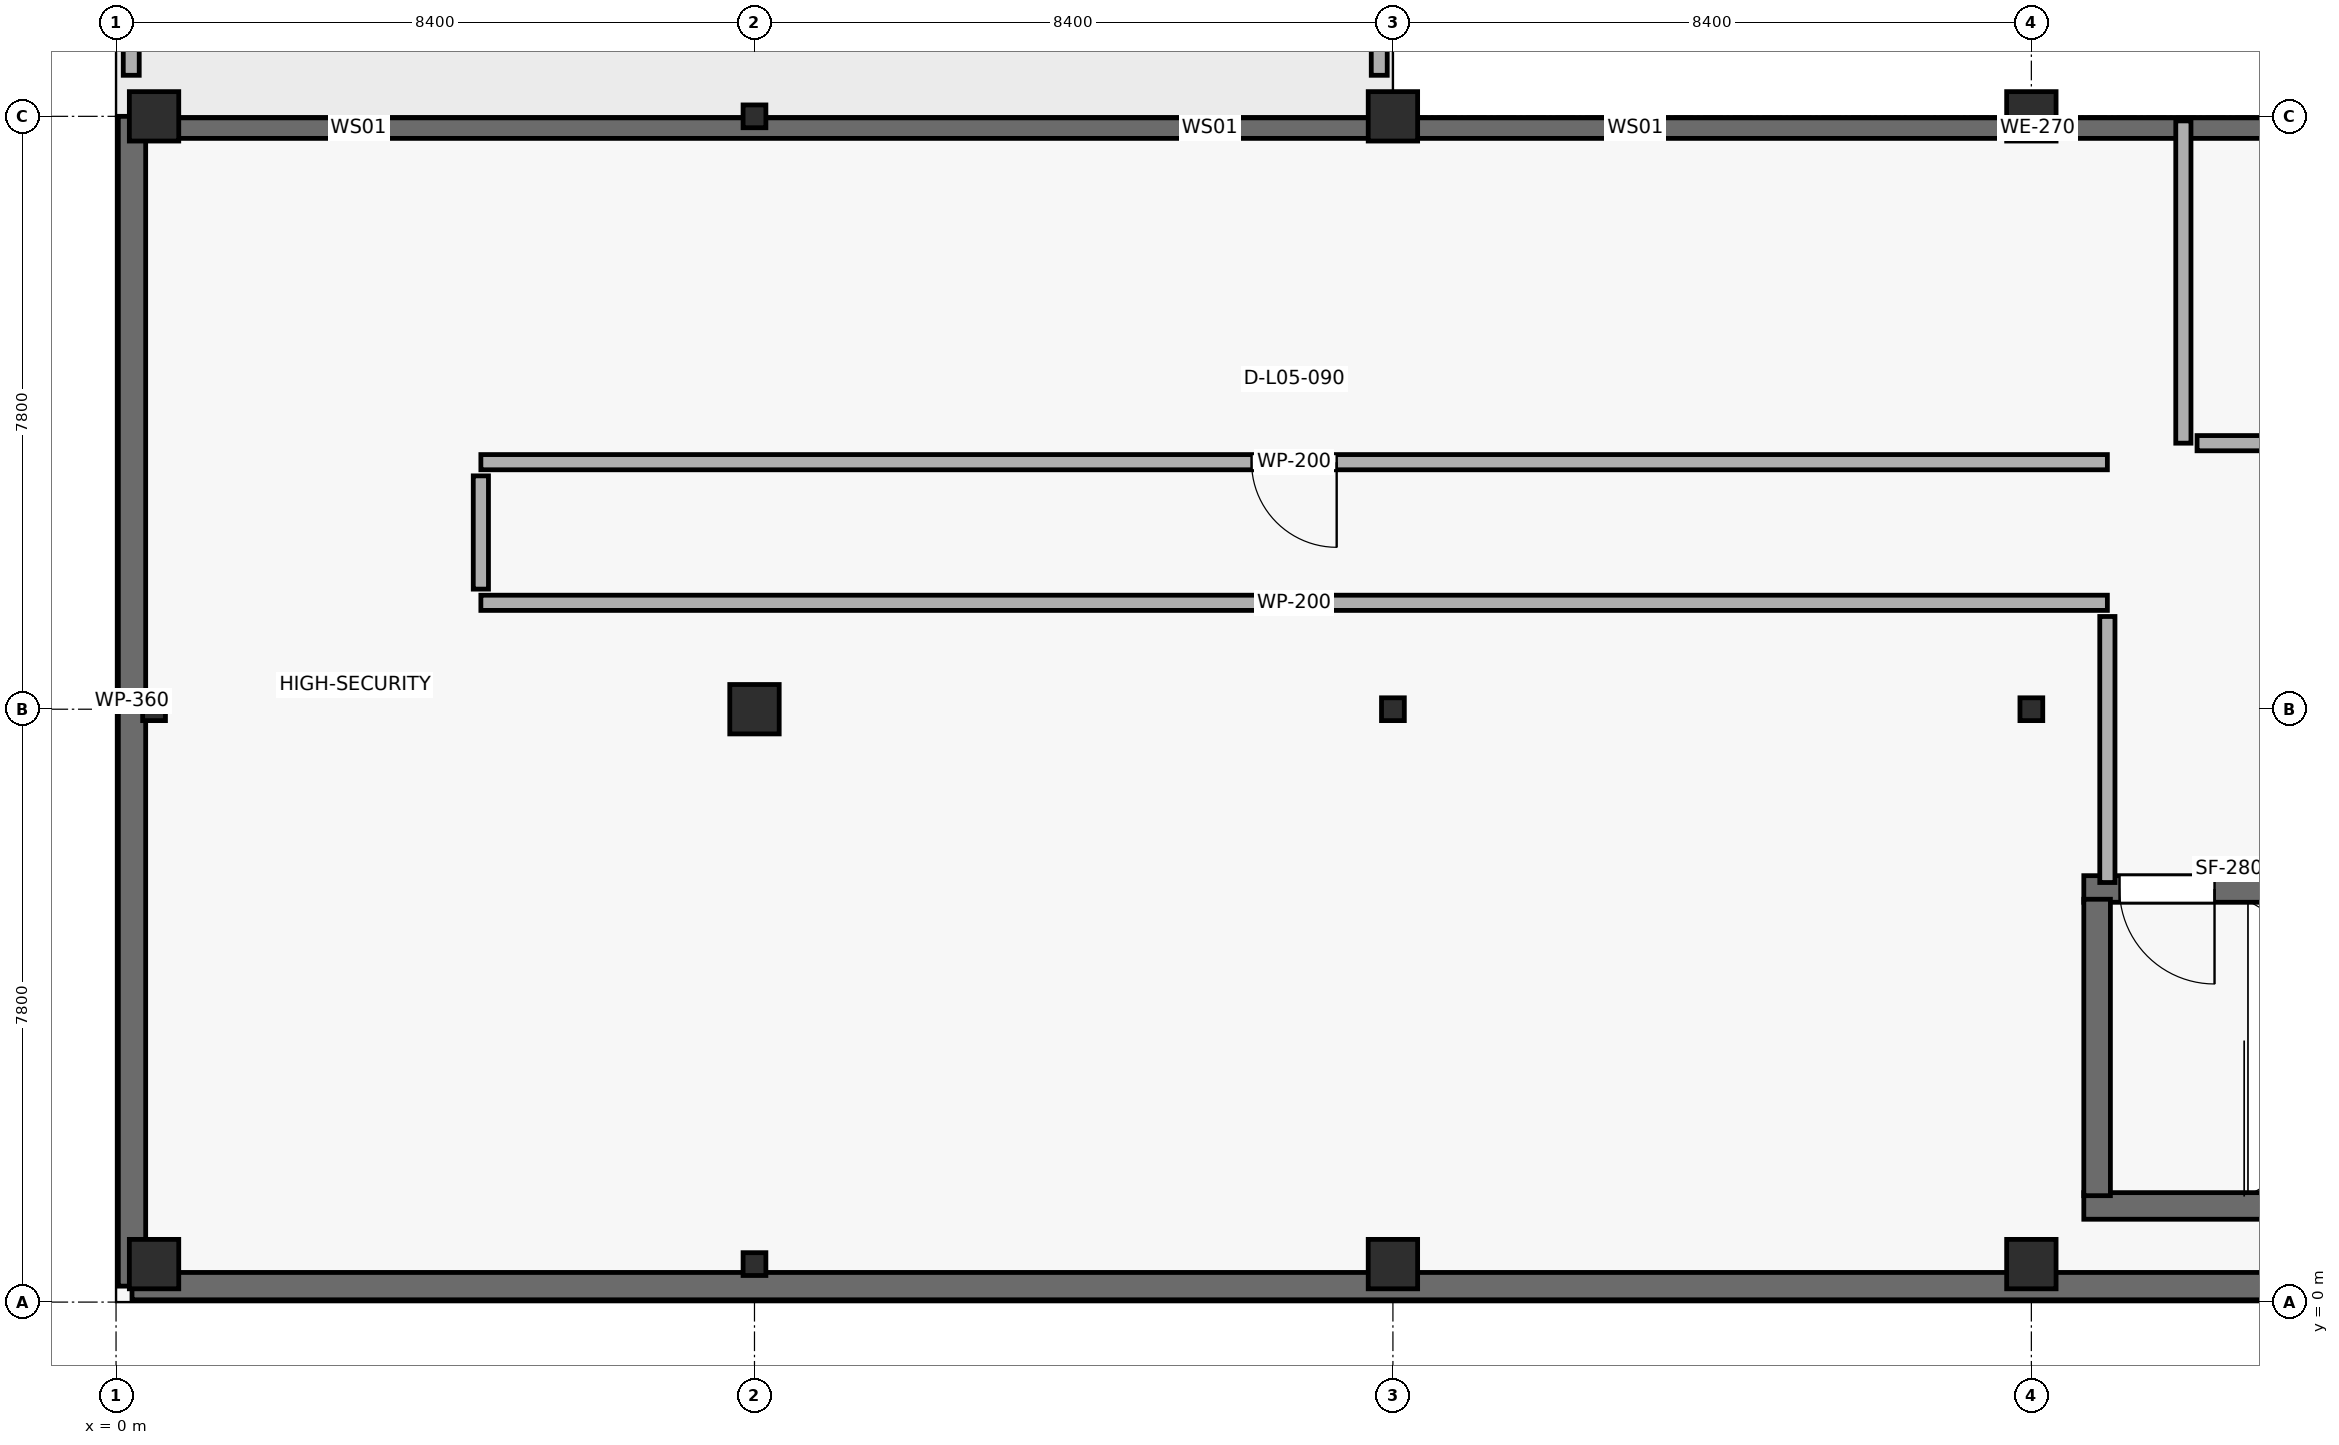
"""IFC4 building model, lengths in metres.
Left out: names, types, materials, properties, quantities, classifications, styles, units other than length and angle.
Written with IfcOpenShell. Run it as: python <this file> out.ifc"""

import sys

from ifc_helpers import new_model, si_unit, direction, frame, frame_2d, origin, origin_2d, place, context, subcontext, project, spatial, rectangle, hollow_rectangle, extrude, element, fill, save


model = new_model("IFC4")
c1 = context("Model", 3, precision=1e-05, world=origin(), true_north=direction((0.0, 1.0)))
c2 = subcontext(c1, "Body", "Model", "MODEL_VIEW")
j1 = project(units=[si_unit("LENGTHUNIT", "METRE"), si_unit("PLANEANGLEUNIT", "RADIAN")], contexts=[c1])
p1 = place(None, origin())
s1 = spatial("IfcSite", under=j1, at=p1, CompositionType="ELEMENT")
p2 = place(p1, origin())
s2 = spatial("IfcBuilding", under=s1, at=p2, CompositionType="ELEMENT")
p3 = place(p2, frame((0.0, 0.0, 20.4)))
s3 = spatial("IfcBuildingStorey", under=s2, at=p3, CompositionType="ELEMENT", Elevation=20.4)
p4 = place(p3, frame((0.5, 0.5, 0.0), z_axis=(0.0, 0.0, 1.0), x_axis=(1.0, 0.0, 0.0)))
e1 = element("IfcColumn", 1, at=p4, inside=s3, PredefinedType="COLUMN", context=c2, shape_type="SweptSolid", body=[
    extrude(rectangle(XDim=0.65, YDim=0.65, at=origin_2d()), origin(), (0.0, 0.0, 1.0), 5.1),
])
p5 = place(p3, frame((0.5, 7.8, 0.0), z_axis=(0.0, 0.0, 1.0), x_axis=(1.0, 0.0, 0.0)))
e2 = element("IfcColumn", 2, at=p5, inside=s3, PredefinedType="COLUMN", context=c2, shape_type="SweptSolid", body=[
    extrude(hollow_rectangle(XDim=0.3, YDim=0.3, WallThickness=0.012, at=origin_2d()), origin(), (0.0, 0.0, 1.0), 5.1),
])
p6 = place(p3, frame((0.5, 15.6, 0.0), z_axis=(0.0, 0.0, 1.0), x_axis=(1.0, 0.0, 0.0)))
e3 = element("IfcColumn", 3, at=p6, inside=s3, PredefinedType="COLUMN", context=c2, shape_type="SweptSolid", body=[
    extrude(rectangle(XDim=0.65, YDim=0.65, at=origin_2d()), origin(), (0.0, 0.0, 1.0), 5.1),
])
p7 = place(p3, frame((8.4, 0.5, 0.0), z_axis=(0.0, 0.0, 1.0), x_axis=(1.0, 0.0, 0.0)))
e4 = element("IfcColumn", 4, at=p7, inside=s3, PredefinedType="COLUMN", context=c2, shape_type="SweptSolid", body=[
    extrude(hollow_rectangle(XDim=0.3, YDim=0.3, WallThickness=0.012, at=origin_2d()), origin(), (0.0, 0.0, 1.0), 5.1),
])
p8 = place(p3, frame((8.4, 7.8, 0.0), z_axis=(0.0, 0.0, 1.0), x_axis=(1.0, 0.0, 0.0)))
e5 = element("IfcColumn", 5, at=p8, inside=s3, PredefinedType="COLUMN", context=c2, shape_type="SweptSolid", body=[
    extrude(rectangle(XDim=0.65, YDim=0.65, at=origin_2d()), origin(), (0.0, 0.0, 1.0), 5.1),
])
p9 = place(p3, frame((8.4, 15.6, 0.0), z_axis=(0.0, 0.0, 1.0), x_axis=(1.0, 0.0, 0.0)))
e6 = element("IfcColumn", 6, at=p9, inside=s3, PredefinedType="COLUMN", context=c2, shape_type="SweptSolid", body=[
    extrude(hollow_rectangle(XDim=0.3, YDim=0.3, WallThickness=0.012, at=origin_2d()), origin(), (0.0, 0.0, 1.0), 5.1),
])
p10 = place(p3, frame((16.8, 0.5, 0.0), z_axis=(0.0, 0.0, 1.0), x_axis=(1.0, 0.0, 0.0)))
e7 = element("IfcColumn", 7, at=p10, inside=s3, PredefinedType="COLUMN", context=c2, shape_type="SweptSolid", body=[
    extrude(rectangle(XDim=0.65, YDim=0.65, at=origin_2d()), origin(), (0.0, 0.0, 1.0), 5.1),
])
p11 = place(p3, frame((16.8, 7.8, 0.0), z_axis=(0.0, 0.0, 1.0), x_axis=(1.0, 0.0, 0.0)))
e8 = element("IfcColumn", 8, at=p11, inside=s3, PredefinedType="COLUMN", context=c2, shape_type="SweptSolid", body=[
    extrude(hollow_rectangle(XDim=0.3, YDim=0.3, WallThickness=0.012, at=origin_2d()), origin(), (0.0, 0.0, 1.0), 5.1),
])
for number, where, z_axis, x_axis in (
    (9, (16.8, 15.6, 0.0), (0.0, 0.0, 1.0), (1.0, 0.0, 0.0)),
    (10, (25.2, 0.5, 0.0), (0.0, 0.0, 1.0), (1.0, 0.0, 0.0)),
):
    element("IfcColumn", number, at=place(p3, frame(where, z_axis=z_axis, x_axis=x_axis)), inside=s3, PredefinedType="COLUMN", context=c2, shape_type="SweptSolid", body=[
        extrude(rectangle(XDim=0.65, YDim=0.65, at=origin_2d()), origin(), (0.0, 0.0, 1.0), 5.1),
    ])
p12 = place(p3, frame((25.2, 7.8, 0.0), z_axis=(0.0, 0.0, 1.0), x_axis=(1.0, 0.0, 0.0)))
e11 = element("IfcColumn", 11, at=p12, inside=s3, PredefinedType="COLUMN", context=c2, shape_type="SweptSolid", body=[
    extrude(hollow_rectangle(XDim=0.3, YDim=0.3, WallThickness=0.012, at=origin_2d()), origin(), (0.0, 0.0, 1.0), 5.1),
])
p13 = place(p3, frame((25.2, 15.6, 0.0), z_axis=(0.0, 0.0, 1.0), x_axis=(1.0, 0.0, 0.0)))
e12 = element("IfcColumn", 12, at=p13, inside=s3, PredefinedType="COLUMN", context=c2, shape_type="SweptSolid", body=[
    extrude(rectangle(XDim=0.65, YDim=0.65, at=origin_2d()), origin(), (0.0, 0.0, 1.0), 5.1),
])
p14 = place(p3, frame((0.165, 15.445, 0.0), z_axis=(0.0, 0.0, 1.0), x_axis=(1.0, 0.0, 0.0)))
e13 = element("IfcWall", 13, at=p14, inside=s3, PredefinedType="SOLIDWALL", context=c2, shape_type="SweptSolid", body=[
    extrude(rectangle(XDim=50.235, YDim=0.27, at=frame_2d((25.117, 0.0))), origin(), (0.0, 0.0, 1.0), 4.88),
])
p15 = place(p14, frame((2.8, 0.0, 1.85)))
e14 = element("IfcOpeningElement", 14, at=p15, cuts=e13, PredefinedType="OPENING", context=c2, shape_type="SweptSolid", body=[
    extrude(rectangle(XDim=0.45, YDim=1.1, at=frame_2d((0.225, 0.55))), frame((0.0, 0.145, 0.0), z_axis=(0.0, -1.0, 0.0), x_axis=(1.0, 0.0, 0.0)), (0.0, 0.0, 1.0), 0.29),
])
p16 = place(p14, frame((14.0, 0.0, 1.85)))
e15 = element("IfcOpeningElement", 15, at=p16, cuts=e13, PredefinedType="OPENING", context=c2, shape_type="SweptSolid", body=[
    extrude(rectangle(XDim=0.45, YDim=1.1, at=frame_2d((0.225, 0.55))), frame((0.0, 0.145, 0.0), z_axis=(0.0, -1.0, 0.0), x_axis=(1.0, 0.0, 0.0)), (0.0, 0.0, 1.0), 0.29),
])
p17 = place(p14, frame((19.6, 0.0, 1.85)))
e16 = element("IfcOpeningElement", 16, at=p17, cuts=e13, PredefinedType="OPENING", context=c2, shape_type="SweptSolid", body=[
    extrude(rectangle(XDim=0.45, YDim=1.1, at=frame_2d((0.225, 0.55))), frame((0.0, 0.145, 0.0), z_axis=(0.0, -1.0, 0.0), x_axis=(1.0, 0.0, 0.0)), (0.0, 0.0, 1.0), 0.29),
])
p18 = place(p14, frame((30.8, 0.0, 1.85)))
e17 = element("IfcOpeningElement", 17, at=p18, cuts=e13, PredefinedType="OPENING", context=c2, shape_type="SweptSolid", body=[
    extrude(rectangle(XDim=0.45, YDim=1.1, at=frame_2d((0.225, 0.55))), frame((0.0, 0.145, 0.0), z_axis=(0.0, -1.0, 0.0), x_axis=(1.0, 0.0, 0.0)), (0.0, 0.0, 1.0), 0.29),
])
p19 = place(p14, frame((36.4, 0.0, 1.85)))
e18 = element("IfcOpeningElement", 18, at=p19, cuts=e13, PredefinedType="OPENING", context=c2, shape_type="SweptSolid", body=[
    extrude(rectangle(XDim=0.45, YDim=1.1, at=frame_2d((0.225, 0.55))), frame((0.0, 0.145, 0.0), z_axis=(0.0, -1.0, 0.0), x_axis=(1.0, 0.0, 0.0)), (0.0, 0.0, 1.0), 0.29),
])
p20 = place(p3, frame((58.8, 0.21, 0.0), z_axis=(0.0, 0.0, 1.0), x_axis=(-1.0, 0.0, 0.0)))
e19 = element("IfcWall", 19, at=p20, inside=s3, PredefinedType="SOLIDWALL", context=c2, shape_type="SweptSolid", body=[
    extrude(rectangle(XDim=58.59, YDim=0.36, at=frame_2d((29.295, 0.0))), origin(), (0.0, 0.0, 1.0), 4.88),
])
p21 = place(p3, frame((0.21, 0.21, 0.0), z_axis=(0.0, 0.0, 1.0), x_axis=(0.0, 1.0, 0.0)))
e20 = element("IfcWall", 20, at=p21, inside=s3, PredefinedType="SOLIDWALL", context=c2, shape_type="SweptSolid", body=[
    extrude(rectangle(XDim=15.39, YDim=0.36, at=frame_2d((7.695, 0.0))), origin(), (0.0, 0.0, 1.0), 4.88),
])
p22 = place(p3, frame((0.2, 16.14, 0.0), z_axis=(0.0, 0.0, 1.0), x_axis=(0.0, 1.0, 0.0)))
e21 = element("IfcWall", 21, at=p22, inside=s3, PredefinedType="PARAPET", context=c2, shape_type="SweptSolid", body=[
    extrude(rectangle(XDim=6.72, YDim=0.21, at=frame_2d((3.36, 0.0))), origin(), (0.0, 0.0, 1.0), 1.12),
])
p23 = place(p3, frame((16.62, 28.26, 0.0), z_axis=(0.0, 0.0, 1.0), x_axis=(0.0, -1.0, 0.0)))
e22 = element("IfcWall", 22, at=p23, inside=s3, PredefinedType="PARAPET", context=c2, shape_type="SweptSolid", body=[
    extrude(rectangle(XDim=12.12, YDim=0.21, at=frame_2d((6.06, 0.0))), origin(), (0.0, 0.0, 1.0), 1.12),
])
p24 = place(p3, frame((25.89, 1.265, 0.0), z_axis=(0.0, 0.0, 1.0), x_axis=(1.0, 0.0, 0.0)))
e23 = element("IfcWall", 23, at=p24, inside=s3, PredefinedType="SHEAR", context=c2, shape_type="SweptSolid", body=[
    extrude(rectangle(XDim=9.22, YDim=0.35, at=frame_2d((4.61, 0.0))), origin(), (0.0, 0.0, 1.0), 4.84),
])
p25 = place(p3, frame((35.11, 5.435, 0.0), z_axis=(0.0, 0.0, 1.0), x_axis=(-1.0, 0.0, 0.0)))
e24 = element("IfcWall", 24, at=p25, inside=s3, PredefinedType="SHEAR", context=c2, shape_type="SweptSolid", body=[
    extrude(rectangle(XDim=9.22, YDim=0.35, at=frame_2d((4.61, 0.0))), origin(), (0.0, 0.0, 1.0), 4.84),
])
p26 = place(p25, frame((7.5, 0.0, 0.0)))
e25 = element("IfcOpeningElement", 25, at=p26, cuts=e24, PredefinedType="OPENING", context=c2, shape_type="SweptSolid", body=[
    extrude(rectangle(XDim=1.25, YDim=2.2, at=frame_2d((0.625, 1.1))), frame((0.0, 0.185, 0.0), z_axis=(0.0, -1.0, 0.0), x_axis=(1.0, 0.0, 0.0)), (0.0, 0.0, 1.0), 0.37),
])
p27 = place(p3, frame((26.065, 1.4, 0.0), z_axis=(0.0, 0.0, 1.0), x_axis=(0.0, 1.0, 0.0)))
e26 = element("IfcWall", 26, at=p27, inside=s3, PredefinedType="SHEAR", context=c2, shape_type="SweptSolid", body=[
    extrude(rectangle(XDim=3.9, YDim=0.35, at=frame_2d((1.95, 0.0))), origin(), (0.0, 0.0, 1.0), 4.84),
])
p28 = place(p3, frame((26.2, 11.05, 0.0), z_axis=(0.0, 0.0, 1.0), x_axis=(-1.0, 0.0, 0.0)))
e27 = element("IfcWall", 27, at=p28, inside=s3, PredefinedType="PARTITIONING", context=c2, shape_type="SweptSolid", body=[
    extrude(rectangle(XDim=21.4, YDim=0.2, at=frame_2d((10.7, 0.0))), origin(), (0.0, 0.0, 1.0), 4.84),
])
p29 = place(p28, frame((10.14, 0.0, 0.0)))
e28 = element("IfcOpeningElement", 28, at=p29, cuts=e27, PredefinedType="OPENING", context=c2, shape_type="SweptSolid", body=[
    extrude(rectangle(XDim=1.12, YDim=2.15, at=frame_2d((0.56, 1.075))), frame((0.0, 0.11, 0.0), z_axis=(0.0, -1.0, 0.0), x_axis=(1.0, 0.0, 0.0)), (0.0, 0.0, 1.0), 0.22),
])
p30 = place(p3, frame((4.8, 9.2, 0.0), z_axis=(0.0, 0.0, 1.0), x_axis=(1.0, 0.0, 0.0)))
e29 = element("IfcWall", 29, at=p30, inside=s3, PredefinedType="PARTITIONING", context=c2, shape_type="SweptSolid", body=[
    extrude(rectangle(XDim=21.4, YDim=0.2, at=frame_2d((10.7, 0.0))), origin(), (0.0, 0.0, 1.0), 4.84),
])
p31 = place(p3, frame((27.2, 15.54, 0.0), z_axis=(0.0, 0.0, 1.0), x_axis=(0.0, -1.0, 0.0)))
e30 = element("IfcWall", 30, at=p31, inside=s3, PredefinedType="PARTITIONING", context=c2, shape_type="SweptSolid", body=[
    extrude(rectangle(XDim=4.24, YDim=0.2, at=frame_2d((2.12, 0.0))), origin(), (0.0, 0.0, 1.0), 4.84),
])
p32 = place(p3, frame((26.2, 9.02, 0.0), z_axis=(0.0, 0.0, 1.0), x_axis=(0.0, -1.0, 0.0)))
e31 = element("IfcWall", 31, at=p32, inside=s3, PredefinedType="PARTITIONING", context=c2, shape_type="SweptSolid", body=[
    extrude(rectangle(XDim=3.5, YDim=0.2, at=frame_2d((1.75, 0.0))), origin(), (0.0, 0.0, 1.0), 4.84),
])
p33 = place(p3, frame((4.8, 10.87, 0.0), z_axis=(0.0, 0.0, 1.0), x_axis=(0.0, -1.0, 0.0)))
e32 = element("IfcWall", 32, at=p33, inside=s3, PredefinedType="PARTITIONING", context=c2, shape_type="SweptSolid", body=[
    extrude(rectangle(XDim=1.49, YDim=0.2, at=frame_2d((0.745, 0.0))), origin(), (0.0, 0.0, 1.0), 4.84),
])
p34 = place(p3, frame((28.8, 11.3, 0.0), z_axis=(0.0, 0.0, 1.0), x_axis=(-1.0, 0.0, 0.0)))
e33 = element("IfcWall", 33, at=p34, inside=s3, PredefinedType="PARTITIONING", context=c2, shape_type="SweptSolid", body=[
    extrude(rectangle(XDim=1.42, YDim=0.2, at=frame_2d((0.71, 0.0))), origin(), (0.0, 0.0, 1.0), 4.84),
])
p35 = place(p15, origin())
e34 = element("IfcWindow", 34, at=p35, inside=s3, PartitioningType="SINGLE_PANEL", PredefinedType="WINDOW", context=c2, shape_type="SweptSolid", body=[
    extrude(rectangle(XDim=0.45, YDim=1.1, at=frame_2d((0.225, 0.55))), frame((0.0, 0.03, 0.0), z_axis=(0.0, -1.0, 0.0), x_axis=(1.0, 0.0, 0.0)), (0.0, 0.0, 1.0), 0.06),
])
fill(e14, e34)
p36 = place(p16, origin())
e35 = element("IfcWindow", 35, at=p36, inside=s3, PartitioningType="SINGLE_PANEL", PredefinedType="WINDOW", context=c2, shape_type="SweptSolid", body=[
    extrude(rectangle(XDim=0.45, YDim=1.1, at=frame_2d((0.225, 0.55))), frame((0.0, 0.03, 0.0), z_axis=(0.0, -1.0, 0.0), x_axis=(1.0, 0.0, 0.0)), (0.0, 0.0, 1.0), 0.06),
])
fill(e15, e35)
p37 = place(p17, origin())
e36 = element("IfcWindow", 36, at=p37, inside=s3, PartitioningType="SINGLE_PANEL", PredefinedType="WINDOW", context=c2, shape_type="SweptSolid", body=[
    extrude(rectangle(XDim=0.45, YDim=1.1, at=frame_2d((0.225, 0.55))), frame((0.0, 0.03, 0.0), z_axis=(0.0, -1.0, 0.0), x_axis=(1.0, 0.0, 0.0)), (0.0, 0.0, 1.0), 0.06),
])
fill(e16, e36)
p38 = place(p26, origin())
e37 = element("IfcDoor", 37, at=p38, inside=s3, OperationType="SINGLE_SWING_LEFT", PredefinedType="DOOR", context=c2, shape_type="SweptSolid", body=[
    extrude(rectangle(XDim=1.25, YDim=2.2, at=frame_2d((0.625, 1.1))), frame((0.0, 0.025, 0.0), z_axis=(0.0, -1.0, 0.0), x_axis=(1.0, 0.0, 0.0)), (0.0, 0.0, 1.0), 0.05),
])
fill(e25, e37)
p39 = place(p29, origin())
e38 = element("IfcDoor", 38, at=p39, inside=s3, OperationType="SINGLE_SWING_LEFT", PredefinedType="DOOR", context=c2, shape_type="SweptSolid", body=[
    extrude(rectangle(XDim=1.12, YDim=2.15, at=frame_2d((0.56, 1.075))), frame((0.0, 0.025, 0.0), z_axis=(0.0, -1.0, 0.0), x_axis=(1.0, 0.0, 0.0)), (0.0, 0.0, 1.0), 0.05),
])
fill(e28, e38)
save(model, sys.argv[1])
